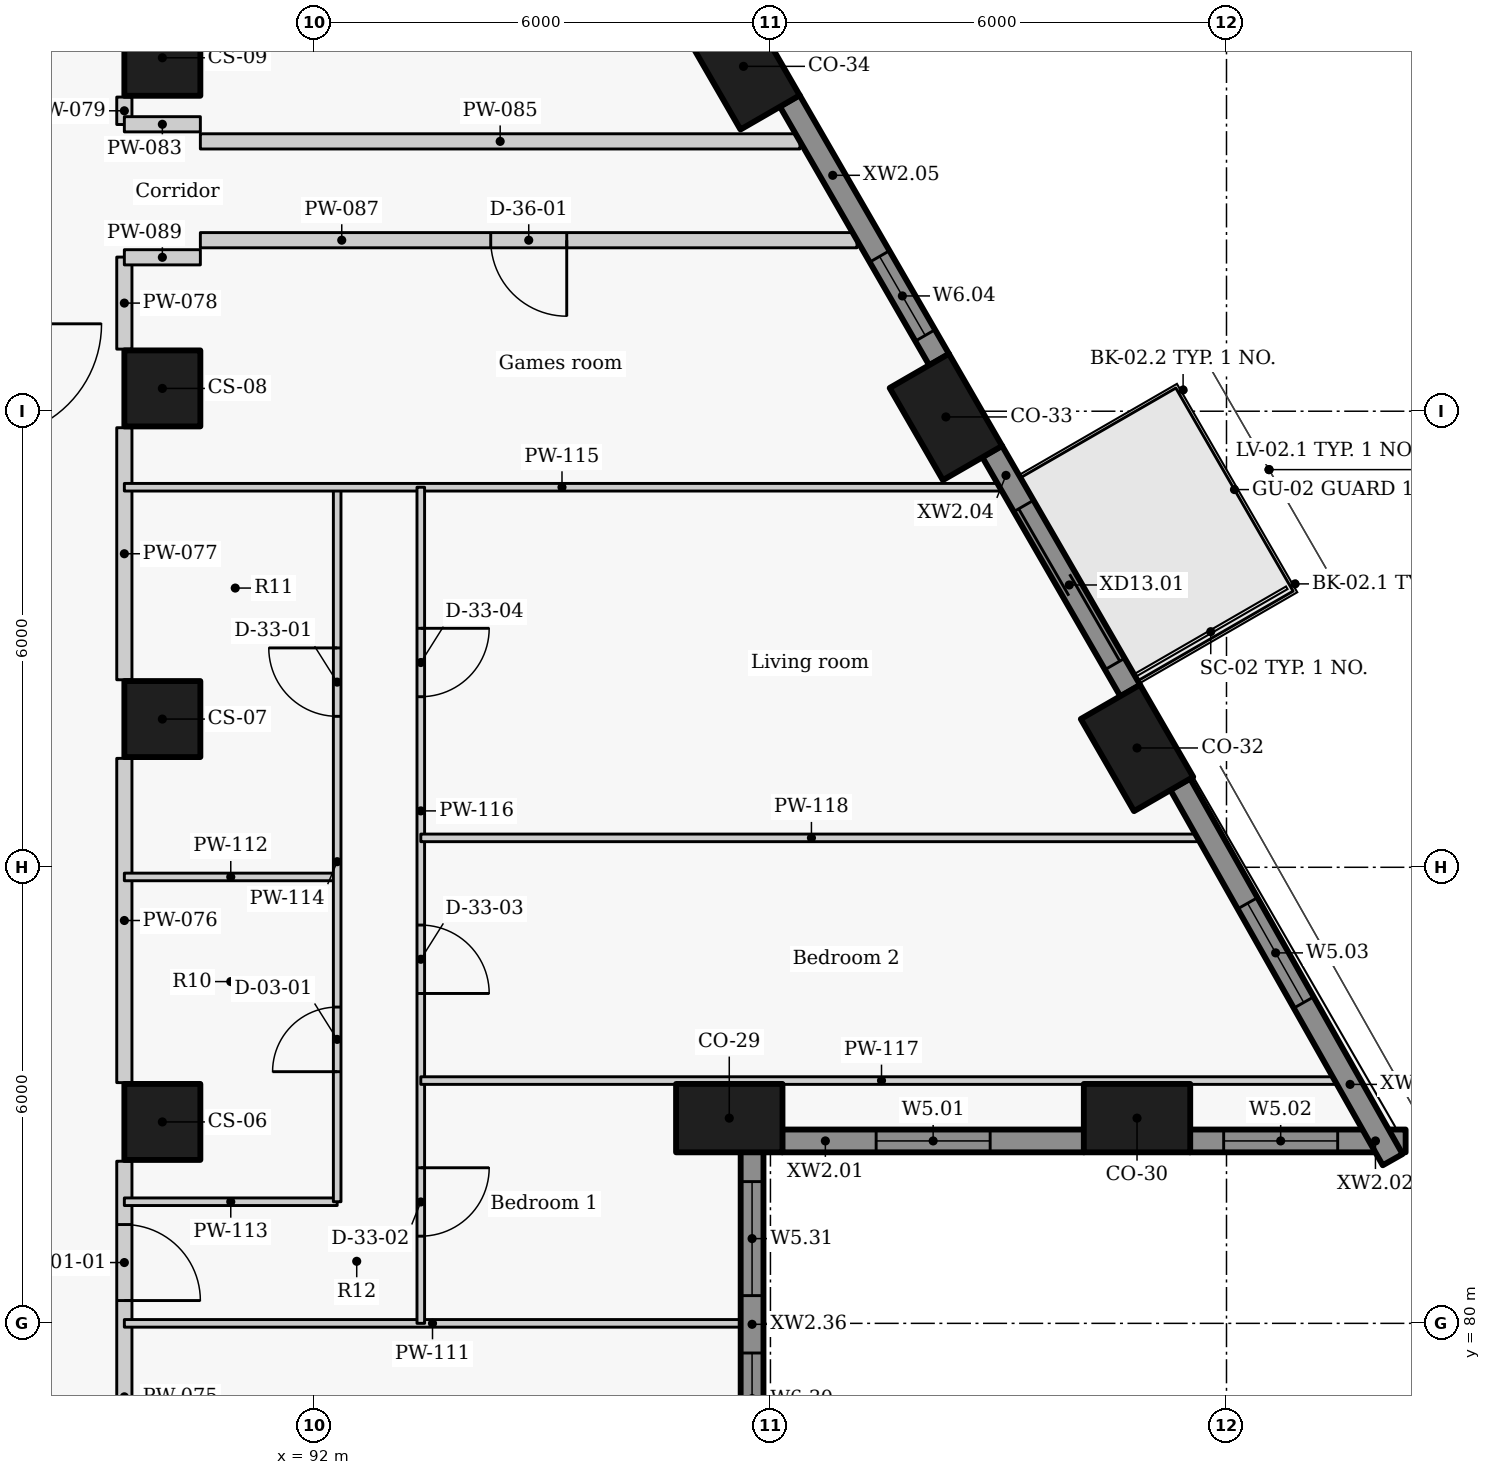
"""IFC4 building model, lengths in metres.
Left out: names, types, materials, properties, quantities, classifications, styles, units other than length and angle.
Written with IfcOpenShell. Run it as: python <this file> out.ifc"""

import sys

from ifc_helpers import new_model, si_unit, direction, frame, frame_2d, origin, origin_2d, place, context, subcontext, project, spatial, rectangle, extrude, element, fill, save


model = new_model("IFC4")
c1 = context("Model", 3, precision=1e-05, world=origin(), true_north=direction((0.0, 1.0)))
c2 = subcontext(c1, "Body", "Model", "MODEL_VIEW")
j1 = project(units=[si_unit("LENGTHUNIT", "METRE"), si_unit("PLANEANGLEUNIT", "RADIAN")], contexts=[c1])
p1 = place(None, origin())
s1 = spatial("IfcSite", under=j1, at=p1, CompositionType="ELEMENT")
p2 = place(p1, origin())
s2 = spatial("IfcBuilding", under=s1, at=p2, CompositionType="ELEMENT")
p3 = place(p2, frame((0.0, 0.0, 117.3)))
s3 = spatial("IfcBuildingStorey", under=s2, at=p3, CompositionType="ELEMENT", Elevation=117.3)
for number, where, z_axis, x_axis in (
    (1, (97.458, 82.7, 0.0), (0.0, 0.0, 1.0), (1.0, 0.0, 0.0)),
    (2, (102.823, 82.7, 0.0), (0.0, 0.0, 1.0), (1.0, 0.0, 0.0)),
    (3, (102.823, 87.57, 0.0), (0.0, 0.0, 1.0), (-0.5, 0.866, 0.0)),
    (4, (100.308, 91.925, 0.0), (0.0, 0.0, 1.0), (-0.5, 0.866, 0.0)),
    (5, (97.646, 96.537, 0.0), (0.0, 0.0, 1.0), (-0.5, 0.866, 0.0)),
):
    element("IfcColumn", number, at=place(p3, frame(where, z_axis=z_axis, x_axis=x_axis)), inside=s3, PredefinedType="COLUMN", context=c2, shape_type="SweptSolid", body=[
        extrude(rectangle(XDim=1.4, YDim=0.9, at=origin_2d()), origin(), (0.0, 0.0, 1.0), 3.3),
    ])
for number, where, z_axis, x_axis in (
    (6, (90.0, 82.65, 0.0), (0.0, 0.0, 1.0), (0.0, 1.0, 0.0)),
    (7, (90.0, 87.95, 0.0), (0.0, 0.0, 1.0), (0.0, 1.0, 0.0)),
    (8, (90.0, 92.3, 0.0), (0.0, 0.0, 1.0), (0.0, 1.0, 0.0)),
    (9, (90.0, 96.65, 0.0), (0.0, 0.0, 1.0), (0.0, 1.0, 0.0)),
):
    element("IfcColumn", number, at=place(p3, frame(where, z_axis=z_axis, x_axis=x_axis)), inside=s3, PredefinedType="COLUMN", context=c2, shape_type="SweptSolid", body=[
        extrude(rectangle(XDim=1.0, YDim=1.0, at=origin_2d()), origin(), (0.0, 0.0, 1.0), 3.3),
    ])
p4 = place(p3, frame((98.154, 82.4, 0.0), z_axis=(0.0, 0.0, 1.0), x_axis=(1.0, 0.0, 0.0)))
e10 = element("IfcWall", 10, at=p4, inside=s3, PredefinedType="SOLIDWALL", context=c2, shape_type="SweptSolid", body=[
    extrude(rectangle(XDim=3.973, YDim=0.3, at=frame_2d((1.986, 0.0))), origin(), (0.0, 0.0, 1.0), 2.05),
])
p5 = place(p4, frame((1.236, 0.0, 0.9)))
e11 = element("IfcOpeningElement", 11, at=p5, cuts=e10, PredefinedType="OPENING", context=c2, shape_type="SweptSolid", body=[
    extrude(rectangle(XDim=1.5, YDim=1.1, at=frame_2d((0.75, 0.55))), frame((0.0, 0.16, 0.0), z_axis=(0.0, -1.0, 0.0), x_axis=(1.0, 0.0, 0.0)), (0.0, 0.0, 1.0), 0.32),
])
p6 = place(p3, frame((103.519, 82.4, 0.0), z_axis=(0.0, 0.0, 1.0), x_axis=(1.0, 0.0, 0.0)))
e12 = element("IfcWall", 12, at=p6, inside=s3, PredefinedType="SOLIDWALL", context=c2, shape_type="SweptSolid", body=[
    extrude(rectangle(XDim=2.838, YDim=0.3, at=frame_2d((1.419, 0.0))), origin(), (0.0, 0.0, 1.0), 2.05),
])
p7 = place(p6, frame((0.444, 0.0, 0.9)))
e13 = element("IfcOpeningElement", 13, at=p7, cuts=e12, PredefinedType="OPENING", context=c2, shape_type="SweptSolid", body=[
    extrude(rectangle(XDim=1.5, YDim=1.1, at=frame_2d((0.75, 0.55))), frame((0.0, 0.16, 0.0), z_axis=(0.0, -1.0, 0.0), x_axis=(1.0, 0.0, 0.0)), (0.0, 0.0, 1.0), 0.32),
])
p8 = place(p3, frame((106.186, 82.153, 0.0), z_axis=(0.0, 0.0, 1.0), x_axis=(-0.492456858874, 0.870336855561, 0.0)))
e14 = element("IfcWall", 14, at=p8, inside=s3, PredefinedType="SOLIDWALL", context=c2, shape_type="SweptSolid", body=[
    extrude(rectangle(XDim=5.677, YDim=0.3, at=frame_2d((2.838, 0.0))), origin(), (0.0, 0.0, 1.0), 2.05),
])
p9 = place(p8, frame((2.376, 0.0, 0.9)))
e15 = element("IfcOpeningElement", 15, at=p9, cuts=e14, PredefinedType="OPENING", context=c2, shape_type="SweptSolid", body=[
    extrude(rectangle(XDim=1.5, YDim=1.1, at=frame_2d((0.75, 0.55))), frame((0.0, 0.16, 0.0), z_axis=(0.0, -1.0, 0.0), x_axis=(1.0, 0.0, 0.0)), (0.0, 0.0, 1.0), 0.32),
])
p10 = place(p3, frame((102.735, 88.323, 0.0), z_axis=(0.0, 0.0, 1.0), x_axis=(-0.500009139881, 0.866020126807, 0.0)))
e16 = element("IfcWall", 16, at=p10, inside=s3, PredefinedType="SOLIDWALL", context=c2, shape_type="SweptSolid", body=[
    extrude(rectangle(XDim=3.637, YDim=0.3, at=frame_2d((1.818, 0.0))), origin(), (0.0, 0.0, 1.0), 2.05),
])
p11 = place(p10, frame((0.407, 0.0, 0.0)))
e17 = element("IfcOpeningElement", 17, at=p11, cuts=e16, PredefinedType="OPENING", context=c2, shape_type="SweptSolid", body=[
    extrude(rectangle(XDim=2.4, YDim=2.0, at=frame_2d((1.2, 1.0))), frame((0.0, 0.16, 0.0), z_axis=(0.0, -1.0, 0.0), x_axis=(1.0, 0.0, 0.0)), (0.0, 0.0, 1.0), 0.32),
])
p12 = place(p3, frame((100.22, 92.677, 0.0), z_axis=(0.0, 0.0, 1.0), x_axis=(-0.499957037901, 0.866050206543, 0.0)))
e18 = element("IfcWall", 18, at=p12, inside=s3, PredefinedType="SOLIDWALL", context=c2, shape_type="SweptSolid", body=[
    extrude(rectangle(XDim=3.934, YDim=0.3, at=frame_2d((1.967, 0.0))), origin(), (0.0, 0.0, 1.0), 2.05),
])
p13 = place(p12, frame((0.369, 0.0, 0.9)))
e19 = element("IfcOpeningElement", 19, at=p13, cuts=e18, PredefinedType="OPENING", context=c2, shape_type="SweptSolid", body=[
    extrude(rectangle(XDim=1.2, YDim=1.1, at=frame_2d((0.6, 0.55))), frame((0.0, 0.16, 0.0), z_axis=(0.0, -1.0, 0.0), x_axis=(1.0, 0.0, 0.0)), (0.0, 0.0, 1.0), 0.32),
])
p14 = place(p3, frame((97.758, 77.996, 0.0), z_axis=(0.0, 0.0, 1.0), x_axis=(0.0, 1.0, 0.0)))
e20 = element("IfcWall", 20, at=p14, inside=s3, PredefinedType="SOLIDWALL", context=c2, shape_type="SweptSolid", body=[
    extrude(rectangle(XDim=4.258, YDim=0.3, at=frame_2d((2.129, 0.0))), origin(), (0.0, 0.0, 1.0), 2.05),
])
p15 = place(p14, frame((0.414, 0.0, 0.9)))
e21 = element("IfcOpeningElement", 21, at=p15, cuts=e20, PredefinedType="OPENING", context=c2, shape_type="SweptSolid", body=[
    extrude(rectangle(XDim=1.2, YDim=1.1, at=frame_2d((0.6, 0.55))), frame((0.0, 0.16, 0.0), z_axis=(0.0, -1.0, 0.0), x_axis=(1.0, 0.0, 0.0)), (0.0, 0.0, 1.0), 0.32),
])
p16 = place(p14, frame((2.369, 0.0, 0.9)))
e22 = element("IfcOpeningElement", 22, at=p16, cuts=e20, PredefinedType="OPENING", context=c2, shape_type="SweptSolid", body=[
    extrude(rectangle(XDim=1.5, YDim=1.1, at=frame_2d((0.75, 0.55))), frame((0.0, 0.16, 0.0), z_axis=(0.0, -1.0, 0.0), x_axis=(1.0, 0.0, 0.0)), (0.0, 0.0, 1.0), 0.32),
])
p17 = place(p3, frame((89.5, 82.133, 0.0), z_axis=(0.0, 0.0, 1.0), x_axis=(0.0, -1.0, 0.0)))
e23 = element("IfcWall", 23, at=p17, inside=s3, PredefinedType="PARTITIONING", context=c2, shape_type="SweptSolid", body=[
    extrude(rectangle(XDim=4.266, YDim=0.2, at=frame_2d((2.133, 0.0))), origin(), (0.0, 0.0, 1.0), 2.95),
])
p18 = place(p17, frame((0.833, 0.0, 0.0)))
e24 = element("IfcOpeningElement", 24, at=p18, cuts=e23, PredefinedType="OPENING", context=c2, shape_type="SweptSolid", body=[
    extrude(rectangle(XDim=1.0, YDim=2.1, at=frame_2d((0.5, 1.05))), frame((0.0, 0.11, 0.0), z_axis=(0.0, -1.0, 0.0), x_axis=(1.0, 0.0, 0.0)), (0.0, 0.0, 1.0), 0.22),
])
p19 = place(p3, frame((89.5, 83.167, 0.0), z_axis=(0.0, 0.0, 1.0), x_axis=(0.0, 1.0, 0.0)))
e25 = element("IfcWall", 25, at=p19, inside=s3, PredefinedType="PARTITIONING", context=c2, shape_type="SweptSolid", body=[
    extrude(rectangle(XDim=4.266, YDim=0.2, at=frame_2d((2.133, 0.0))), origin(), (0.0, 0.0, 1.0), 2.95),
])
p20 = place(p3, frame((89.5, 88.467, 0.0), z_axis=(0.0, 0.0, 1.0), x_axis=(0.0, 1.0, 0.0)))
e26 = element("IfcWall", 26, at=p20, inside=s3, PredefinedType="PARTITIONING", context=c2, shape_type="SweptSolid", body=[
    extrude(rectangle(XDim=3.316, YDim=0.2, at=frame_2d((1.658, 0.0))), origin(), (0.0, 0.0, 1.0), 2.95),
])
p21 = place(p3, frame((89.5, 92.817, 0.0), z_axis=(0.0, 0.0, 1.0), x_axis=(0.0, 1.0, 0.0)))
e27 = element("IfcWall", 27, at=p21, inside=s3, PredefinedType="PARTITIONING", context=c2, shape_type="SweptSolid", body=[
    extrude(rectangle(XDim=1.211, YDim=0.2, at=frame_2d((0.605, 0.0))), origin(), (0.0, 0.0, 1.0), 2.95),
])
p22 = place(p3, frame((89.5, 95.772, 0.0), z_axis=(0.0, 0.0, 1.0), x_axis=(0.0, 1.0, 0.0)))
e28 = element("IfcWall", 28, at=p22, inside=s3, PredefinedType="PARTITIONING", context=c2, shape_type="SweptSolid", body=[
    extrude(rectangle(XDim=0.361, YDim=0.2, at=frame_2d((0.181, 0.0))), origin(), (0.0, 0.0, 1.0), 2.95),
])
p23 = place(p3, frame((89.5, 95.775, 0.0), z_axis=(0.0, 0.0, 1.0), x_axis=(1.0, 0.0, 0.0)))
e29 = element("IfcWall", 29, at=p23, inside=s3, PredefinedType="PARTITIONING", context=c2, shape_type="SweptSolid", body=[
    extrude(rectangle(XDim=1.0, YDim=0.2, at=frame_2d((0.5, 0.0))), origin(), (0.0, 0.0, 1.0), 2.43),
])
p24 = place(p3, frame((90.5, 95.55, 0.0), z_axis=(0.0, 0.0, 1.0), x_axis=(1.0, 0.0, 0.0)))
e30 = element("IfcWall", 30, at=p24, inside=s3, PredefinedType="PARTITIONING", context=c2, shape_type="SweptSolid", body=[
    extrude(rectangle(XDim=7.889, YDim=0.2, at=frame_2d((3.944, 0.0))), origin(), (0.0, 0.0, 1.0), 2.03),
])
p25 = place(p3, frame((99.139, 94.25, 0.0), z_axis=(0.0, 0.0, 1.0), x_axis=(-1.0, 0.0, 0.0)))
e31 = element("IfcWall", 31, at=p25, inside=s3, PredefinedType="PARTITIONING", context=c2, shape_type="SweptSolid", body=[
    extrude(rectangle(XDim=8.639, YDim=0.2, at=frame_2d((4.32, 0.0))), origin(), (0.0, 0.0, 1.0), 2.03),
])
p26 = place(p25, frame((3.819, 0.0, 0.0)))
e32 = element("IfcOpeningElement", 32, at=p26, cuts=e31, PredefinedType="OPENING", context=c2, shape_type="SweptSolid", body=[
    extrude(rectangle(XDim=1.0, YDim=2.01, at=frame_2d((0.5, 1.005))), frame((0.0, 0.11, 0.0), z_axis=(0.0, -1.0, 0.0), x_axis=(1.0, 0.0, 0.0)), (0.0, 0.0, 1.0), 0.22),
])
p27 = place(p3, frame((89.5, 94.025, 0.0), z_axis=(0.0, 0.0, 1.0), x_axis=(1.0, 0.0, 0.0)))
e33 = element("IfcWall", 33, at=p27, inside=s3, PredefinedType="PARTITIONING", context=c2, shape_type="SweptSolid", body=[
    extrude(rectangle(XDim=1.0, YDim=0.2, at=frame_2d((0.5, 0.0))), origin(), (0.0, 0.0, 1.0), 2.43),
])
p28 = place(p3, frame((89.5, 80.0, 0.0), z_axis=(0.0, 0.0, 1.0), x_axis=(1.0, 0.0, 0.0)))
e34 = element("IfcWall", 34, at=p28, inside=s3, PredefinedType="PARTITIONING", context=c2, shape_type="SweptSolid", body=[
    extrude(rectangle(XDim=8.108, YDim=0.1, at=frame_2d((4.054, 0.0))), origin(), (0.0, 0.0, 1.0), 2.03),
])
for number, where, z_axis, x_axis in (
    (35, (89.5, 85.873, 0.0), (0.0, 0.0, 1.0), (1.0, 0.0, 0.0)),
    (36, (89.5, 81.6, 0.0), (0.0, 0.0, 1.0), (1.0, 0.0, 0.0)),
):
    element("IfcWall", number, at=place(p3, frame(where, z_axis=z_axis, x_axis=x_axis)), inside=s3, PredefinedType="PARTITIONING", context=c2, shape_type="SweptSolid", body=[
        extrude(rectangle(XDim=2.8, YDim=0.1, at=frame_2d((1.4, 0.0))), origin(), (0.0, 0.0, 1.0), 2.43),
    ])
p29 = place(p3, frame((92.3, 81.6, 0.0), z_axis=(0.0, 0.0, 1.0), x_axis=(0.0, 1.0, 0.0)))
e37 = element("IfcWall", 37, at=p29, inside=s3, PredefinedType="PARTITIONING", context=c2, shape_type="SweptSolid", body=[
    extrude(rectangle(XDim=9.4, YDim=0.1, at=frame_2d((4.7, 0.0))), origin(), (0.0, 0.0, 1.0), 2.95),
])
p30 = place(p29, frame((1.711, 0.0, 0.0)))
e38 = element("IfcOpeningElement", 38, at=p30, cuts=e37, PredefinedType="OPENING", context=c2, shape_type="SweptSolid", body=[
    extrude(rectangle(XDim=0.85, YDim=2.1, at=frame_2d((0.425, 1.05))), frame((0.0, 0.06, 0.0), z_axis=(0.0, -1.0, 0.0), x_axis=(1.0, 0.0, 0.0)), (0.0, 0.0, 1.0), 0.12),
])
p31 = place(p29, frame((6.386, 0.0, 0.0)))
e39 = element("IfcOpeningElement", 39, at=p31, cuts=e37, PredefinedType="OPENING", context=c2, shape_type="SweptSolid", body=[
    extrude(rectangle(XDim=0.9, YDim=2.1, at=frame_2d((0.45, 1.05))), frame((0.0, 0.06, 0.0), z_axis=(0.0, -1.0, 0.0), x_axis=(1.0, 0.0, 0.0)), (0.0, 0.0, 1.0), 0.12),
])
p32 = place(p3, frame((89.5, 91.0, 0.0), z_axis=(0.0, 0.0, 1.0), x_axis=(1.0, 0.0, 0.0)))
e40 = element("IfcWall", 40, at=p32, inside=s3, PredefinedType="PARTITIONING", context=c2, shape_type="SweptSolid", body=[
    extrude(rectangle(XDim=11.515, YDim=0.1, at=frame_2d((5.758, 0.0))), origin(), (0.0, 0.0, 1.0), 2.03),
])
p33 = place(p3, frame((93.4, 91.0, 0.0), z_axis=(0.0, 0.0, 1.0), x_axis=(0.0, -1.0, 0.0)))
e41 = element("IfcWall", 41, at=p33, inside=s3, PredefinedType="PARTITIONING", context=c2, shape_type="SweptSolid", body=[
    extrude(rectangle(XDim=11.0, YDim=0.1, at=frame_2d((5.5, 0.0))), origin(), (0.0, 0.0, 1.0), 2.95),
])
p34 = place(p33, frame((8.953, 0.0, 0.0)))
e42 = element("IfcOpeningElement", 42, at=p34, cuts=e41, PredefinedType="OPENING", context=c2, shape_type="SweptSolid", body=[
    extrude(rectangle(XDim=0.9, YDim=2.1, at=frame_2d((0.45, 1.05))), frame((0.0, 0.06, 0.0), z_axis=(0.0, -1.0, 0.0), x_axis=(1.0, 0.0, 0.0)), (0.0, 0.0, 1.0), 0.12),
])
p35 = place(p33, frame((5.76, 0.0, 0.0)))
e43 = element("IfcOpeningElement", 43, at=p35, cuts=e41, PredefinedType="OPENING", context=c2, shape_type="SweptSolid", body=[
    extrude(rectangle(XDim=0.9, YDim=2.1, at=frame_2d((0.45, 1.05))), frame((0.0, 0.06, 0.0), z_axis=(0.0, -1.0, 0.0), x_axis=(1.0, 0.0, 0.0)), (0.0, 0.0, 1.0), 0.12),
])
p36 = place(p33, frame((1.856, 0.0, 0.0)))
e44 = element("IfcOpeningElement", 44, at=p36, cuts=e41, PredefinedType="OPENING", context=c2, shape_type="SweptSolid", body=[
    extrude(rectangle(XDim=0.9, YDim=2.1, at=frame_2d((0.45, 1.05))), frame((0.0, 0.06, 0.0), z_axis=(0.0, -1.0, 0.0), x_axis=(1.0, 0.0, 0.0)), (0.0, 0.0, 1.0), 0.12),
])
p37 = place(p3, frame((93.4, 83.194, 0.0), z_axis=(0.0, 0.0, 1.0), x_axis=(1.0, 0.0, 0.0)))
e45 = element("IfcWall", 45, at=p37, inside=s3, PredefinedType="PARTITIONING", context=c2, shape_type="SweptSolid", body=[
    extrude(rectangle(XDim=12.123, YDim=0.1, at=frame_2d((6.062, 0.0))), origin(), (0.0, 0.0, 1.0), 2.03),
])
p38 = place(p3, frame((93.4, 86.387, 0.0), z_axis=(0.0, 0.0, 1.0), x_axis=(1.0, 0.0, 0.0)))
e46 = element("IfcWall", 46, at=p38, inside=s3, PredefinedType="PARTITIONING", context=c2, shape_type="SweptSolid", body=[
    extrude(rectangle(XDim=10.279, YDim=0.1, at=frame_2d((5.139, 0.0))), origin(), (0.0, 0.0, 1.0), 2.03),
])
p39 = place(p5, origin())
e47 = element("IfcWindow", 47, at=p39, inside=s3, PartitioningType="SINGLE_PANEL", PredefinedType="WINDOW", context=c2, shape_type="SweptSolid", body=[
    extrude(rectangle(XDim=1.5, YDim=1.1, at=frame_2d((0.75, 0.55))), frame((0.0, 0.03, 0.0), z_axis=(0.0, -1.0, 0.0), x_axis=(1.0, 0.0, 0.0)), (0.0, 0.0, 1.0), 0.06),
])
fill(e11, e47)
p40 = place(p7, origin())
e48 = element("IfcWindow", 48, at=p40, inside=s3, PartitioningType="SINGLE_PANEL", PredefinedType="WINDOW", context=c2, shape_type="SweptSolid", body=[
    extrude(rectangle(XDim=1.5, YDim=1.1, at=frame_2d((0.75, 0.55))), frame((0.0, 0.03, 0.0), z_axis=(0.0, -1.0, 0.0), x_axis=(1.0, 0.0, 0.0)), (0.0, 0.0, 1.0), 0.06),
])
fill(e13, e48)
p41 = place(p9, origin())
e49 = element("IfcWindow", 49, at=p41, inside=s3, PartitioningType="SINGLE_PANEL", PredefinedType="WINDOW", context=c2, shape_type="SweptSolid", body=[
    extrude(rectangle(XDim=1.5, YDim=1.1, at=frame_2d((0.75, 0.55))), frame((0.0, 0.03, 0.0), z_axis=(0.0, -1.0, 0.0), x_axis=(1.0, 0.0, 0.0)), (0.0, 0.0, 1.0), 0.06),
])
fill(e15, e49)
p42 = place(p11, origin())
e50 = element("IfcDoor", 50, at=p42, inside=s3, OperationType="DOUBLE_DOOR_SLIDING", PredefinedType="DOOR", context=c2, shape_type="SweptSolid", body=[
    extrude(rectangle(XDim=2.4, YDim=2.0, at=frame_2d((1.2, 1.0))), frame((0.0, 0.025, 0.0), z_axis=(0.0, -1.0, 0.0), x_axis=(1.0, 0.0, 0.0)), (0.0, 0.0, 1.0), 0.05),
])
fill(e17, e50)
p43 = place(p13, origin())
e51 = element("IfcWindow", 51, at=p43, inside=s3, PartitioningType="SINGLE_PANEL", PredefinedType="WINDOW", context=c2, shape_type="SweptSolid", body=[
    extrude(rectangle(XDim=1.2, YDim=1.1, at=frame_2d((0.6, 0.55))), frame((0.0, 0.03, 0.0), z_axis=(0.0, -1.0, 0.0), x_axis=(1.0, 0.0, 0.0)), (0.0, 0.0, 1.0), 0.06),
])
fill(e19, e51)
p44 = place(p15, origin())
e52 = element("IfcWindow", 52, at=p44, inside=s3, PartitioningType="SINGLE_PANEL", PredefinedType="WINDOW", context=c2, shape_type="SweptSolid", body=[
    extrude(rectangle(XDim=1.2, YDim=1.1, at=frame_2d((0.6, 0.55))), frame((0.0, 0.03, 0.0), z_axis=(0.0, -1.0, 0.0), x_axis=(1.0, 0.0, 0.0)), (0.0, 0.0, 1.0), 0.06),
])
fill(e21, e52)
p45 = place(p16, origin())
e53 = element("IfcWindow", 53, at=p45, inside=s3, PartitioningType="SINGLE_PANEL", PredefinedType="WINDOW", context=c2, shape_type="SweptSolid", body=[
    extrude(rectangle(XDim=1.5, YDim=1.1, at=frame_2d((0.75, 0.55))), frame((0.0, 0.03, 0.0), z_axis=(0.0, -1.0, 0.0), x_axis=(1.0, 0.0, 0.0)), (0.0, 0.0, 1.0), 0.06),
])
fill(e22, e53)
p46 = place(p18, origin())
e54 = element("IfcDoor", 54, at=p46, inside=s3, OperationType="SINGLE_SWING_RIGHT", PredefinedType="DOOR", context=c2, shape_type="SweptSolid", body=[
    extrude(rectangle(XDim=1.0, YDim=2.1, at=frame_2d((0.5, 1.05))), frame((0.0, 0.025, 0.0), z_axis=(0.0, -1.0, 0.0), x_axis=(1.0, 0.0, 0.0)), (0.0, 0.0, 1.0), 0.05),
])
fill(e24, e54)
p47 = place(p30, origin())
e55 = element("IfcDoor", 55, at=p47, inside=s3, OperationType="SINGLE_SWING_LEFT", PredefinedType="DOOR", context=c2, shape_type="SweptSolid", body=[
    extrude(rectangle(XDim=0.85, YDim=2.1, at=frame_2d((0.425, 1.05))), frame((0.0, 0.025, 0.0), z_axis=(0.0, -1.0, 0.0), x_axis=(1.0, 0.0, 0.0)), (0.0, 0.0, 1.0), 0.05),
])
fill(e38, e55)
p48 = place(p31, origin())
e56 = element("IfcDoor", 56, at=p48, inside=s3, OperationType="SINGLE_SWING_RIGHT", PredefinedType="DOOR", context=c2, shape_type="SweptSolid", body=[
    extrude(rectangle(XDim=0.9, YDim=2.1, at=frame_2d((0.45, 1.05))), frame((0.0, 0.025, 0.0), z_axis=(0.0, -1.0, 0.0), x_axis=(1.0, 0.0, 0.0)), (0.0, 0.0, 1.0), 0.05),
])
fill(e39, e56)
p49 = place(p34, origin())
e57 = element("IfcDoor", 57, at=p49, inside=s3, OperationType="SINGLE_SWING_LEFT", PredefinedType="DOOR", context=c2, shape_type="SweptSolid", body=[
    extrude(rectangle(XDim=0.9, YDim=2.1, at=frame_2d((0.45, 1.05))), frame((0.0, 0.025, 0.0), z_axis=(0.0, -1.0, 0.0), x_axis=(1.0, 0.0, 0.0)), (0.0, 0.0, 1.0), 0.05),
])
fill(e42, e57)
p50 = place(p35, origin())
e58 = element("IfcDoor", 58, at=p50, inside=s3, OperationType="SINGLE_SWING_RIGHT", PredefinedType="DOOR", context=c2, shape_type="SweptSolid", body=[
    extrude(rectangle(XDim=0.9, YDim=2.1, at=frame_2d((0.45, 1.05))), frame((0.0, 0.025, 0.0), z_axis=(0.0, -1.0, 0.0), x_axis=(1.0, 0.0, 0.0)), (0.0, 0.0, 1.0), 0.05),
])
fill(e43, e58)
p51 = place(p36, origin())
e59 = element("IfcDoor", 59, at=p51, inside=s3, OperationType="SINGLE_SWING_LEFT", PredefinedType="DOOR", context=c2, shape_type="SweptSolid", body=[
    extrude(rectangle(XDim=0.9, YDim=2.1, at=frame_2d((0.45, 1.05))), frame((0.0, 0.025, 0.0), z_axis=(0.0, -1.0, 0.0), x_axis=(1.0, 0.0, 0.0)), (0.0, 0.0, 1.0), 0.05),
])
fill(e44, e59)
p52 = place(p26, origin())
e60 = element("IfcDoor", 60, at=p52, inside=s3, OperationType="SINGLE_SWING_LEFT", PredefinedType="DOOR", context=c2, shape_type="SweptSolid", body=[
    extrude(rectangle(XDim=1.0, YDim=2.01, at=frame_2d((0.5, 1.005))), frame((0.0, 0.025, 0.0), z_axis=(0.0, -1.0, 0.0), x_axis=(1.0, 0.0, 0.0)), (0.0, 0.0, 1.0), 0.05),
])
fill(e32, e60)
save(model, sys.argv[1])
